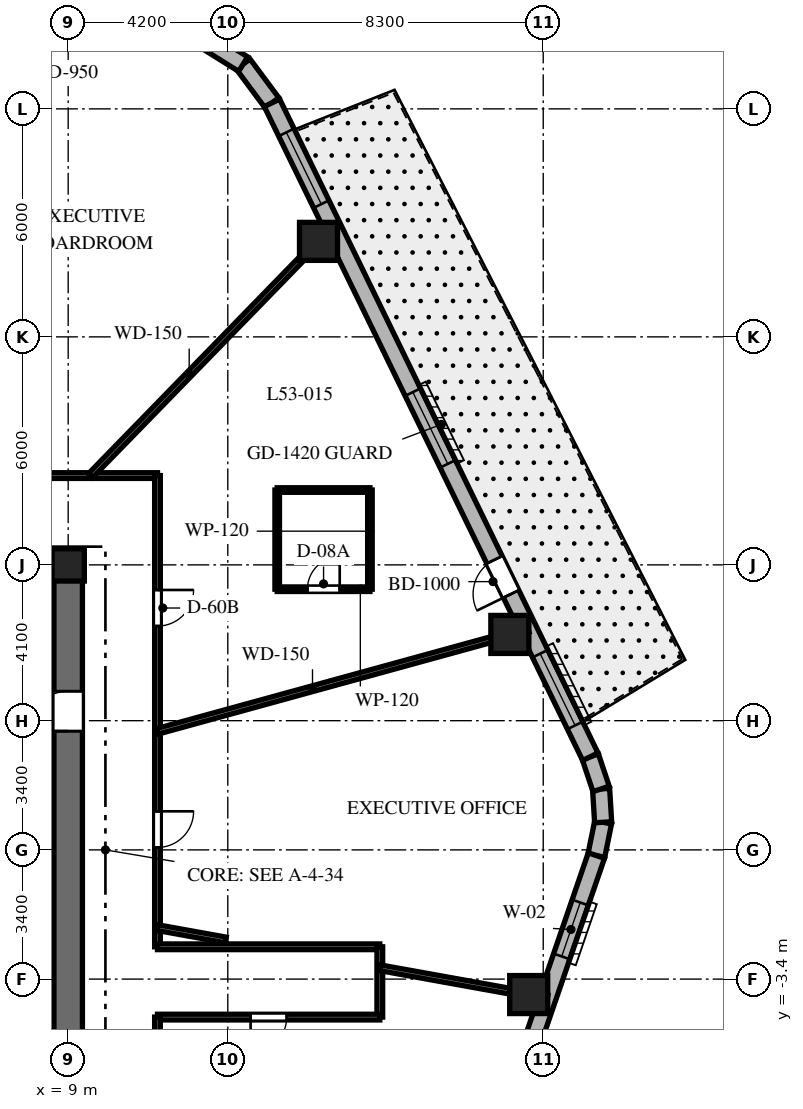
"""IFC4 building model, lengths in metres.
Left out: names, types, materials, properties, quantities, classifications, styles, units other than length and angle.
Written with IfcOpenShell. Run it as: python <this file> out.ifc"""

import sys

from ifc_helpers import new_model, si_unit, direction, frame, frame_2d, origin, origin_2d, place, context, subcontext, project, spatial, rectangle, extrude, element, fill, save


model = new_model("IFC4")
c1 = context("Model", 3, precision=1e-05, world=origin(), true_north=direction((0.0, 1.0)))
c2 = subcontext(c1, "Body", "Model", "MODEL_VIEW")
j1 = project(units=[si_unit("LENGTHUNIT", "METRE"), si_unit("PLANEANGLEUNIT", "RADIAN")], contexts=[c1])
p1 = place(None, origin())
s1 = spatial("IfcSite", under=j1, at=p1, CompositionType="ELEMENT")
p2 = place(p1, origin())
s2 = spatial("IfcBuilding", under=s1, at=p2, CompositionType="ELEMENT")
p3 = place(p2, frame((0.0, 0.0, 214.1)))
s3 = spatial("IfcBuildingStorey", under=s2, at=p3, CompositionType="ELEMENT", Elevation=214.1)
p4 = place(p3, frame((1.85, 7.5, 0.0), z_axis=(0.0, 0.0, 1.0), x_axis=(1.0, 0.0, 0.0)))
e1 = element("IfcWall", 1, at=p4, inside=s3, PredefinedType="SHEAR", context=c2, shape_type="SweptSolid", body=[
    extrude(rectangle(XDim=7.525, YDim=0.75, at=frame_2d((3.762, 0.0))), origin(), (0.0, 0.0, 1.0), 3.8),
])
p5 = place(p3, frame((9.0, -7.125, 0.0), z_axis=(0.0, 0.0, 1.0), x_axis=(0.0, 1.0, 0.0)))
e2 = element("IfcWall", 2, at=p5, inside=s3, PredefinedType="SHEAR", context=c2, shape_type="SweptSolid", body=[
    extrude(rectangle(XDim=14.25, YDim=0.75, at=frame_2d((7.125, 0.0))), origin(), (0.0, 0.0, 1.0), 3.8),
])
p6 = place(p5, frame((10.25, 0.0, 0.0)))
e3 = element("IfcOpeningElement", 3, at=p6, cuts=e2, PredefinedType="OPENING", context=c2, shape_type="SweptSolid", body=[
    extrude(rectangle(XDim=1.05, YDim=2.15, at=frame_2d((0.525, 1.075))), frame((0.0, 0.385, 0.0), z_axis=(0.0, -1.0, 0.0), x_axis=(1.0, 0.0, 0.0)), (0.0, 0.0, 1.0), 0.77),
])
p7 = place(p3, frame((9.0, 7.5, 0.0), z_axis=(0.0, 0.0, 1.0), x_axis=(1.0, 0.0, 0.0)))
e4 = element("IfcColumn", 4, at=p7, inside=s3, PredefinedType="COLUMN", context=c2, shape_type="SweptSolid", body=[
    extrude(rectangle(XDim=0.85, YDim=0.85, at=origin_2d()), origin(), (0.0, 0.0, 1.0), 3.8),
])
for number, where, z_axis, x_axis in (
    (5, (21.118, -3.807, 0.0), (0.0, 0.0, 1.0), (1.0, 0.0, 0.0)),
    (6, (20.622, 5.67, 0.0), (0.0, 0.0, 1.0), (1.0, 0.0, 0.0)),
    (7, (15.587, 16.013, 0.0), (0.0, 0.0, 1.0), (1.0, 0.0, 0.0)),
):
    element("IfcColumn", number, at=place(p3, frame(where, z_axis=z_axis, x_axis=x_axis)), inside=s3, PredefinedType="COLUMN", context=c2, shape_type="SweptSolid", body=[
        extrude(rectangle(XDim=1.0, YDim=1.0, at=origin_2d()), origin(), (0.0, 0.0, 1.0), 3.8),
    ])
p8 = place(p3, frame((22.898, -0.15, 0.0), z_axis=(0.0, 0.0, 1.0), x_axis=(0.199055826889, 0.979988151858, 0.0)))
e8 = element("IfcWall", 8, at=p8, inside=s3, PredefinedType="SOLIDWALL", context=c2, shape_type="SweptSolid", body=[
    extrude(rectangle(XDim=0.894, YDim=0.45, at=frame_2d((0.447, 0.0))), origin(), (0.0, 0.0, 1.0), 3.5),
])
p9 = place(p3, frame((23.076, 0.727, 0.0), z_axis=(0.0, 0.0, 1.0), x_axis=(-0.060805222108, 0.998149650586, 0.0)))
e9 = element("IfcWall", 9, at=p9, inside=s3, PredefinedType="SOLIDWALL", context=c2, shape_type="SweptSolid", body=[
    extrude(rectangle(XDim=0.879, YDim=0.45, at=frame_2d((0.44, 0.0))), origin(), (0.0, 0.0, 1.0), 3.5),
])
p10 = place(p3, frame((23.023, 1.604, 0.0), z_axis=(0.0, 0.0, 1.0), x_axis=(-0.316801227695, 0.948491951537, 0.0)))
e10 = element("IfcWall", 10, at=p10, inside=s3, PredefinedType="SOLIDWALL", context=c2, shape_type="SweptSolid", body=[
    extrude(rectangle(XDim=0.894, YDim=0.45, at=frame_2d((0.447, 0.0))), origin(), (0.0, 0.0, 1.0), 3.5),
])
p11 = place(p3, frame((14.362, 19.658, 0.0), z_axis=(0.0, 0.0, 1.0), x_axis=(-0.596642462792, 0.80250717853, 0.0)))
e11 = element("IfcWall", 11, at=p11, inside=s3, PredefinedType="SOLIDWALL", context=c2, shape_type="SweptSolid", body=[
    extrude(rectangle(XDim=1.27, YDim=0.45, at=frame_2d((0.635, 0.0))), origin(), (0.0, 0.0, 1.0), 3.5),
])
p12 = place(p3, frame((13.604, 20.678, 0.0), z_axis=(0.0, 0.0, 1.0), x_axis=(-0.847910404124, 0.53013955387, 0.0)))
e12 = element("IfcWall", 12, at=p12, inside=s3, PredefinedType="SOLIDWALL", context=c2, shape_type="SweptSolid", body=[
    extrude(rectangle(XDim=1.249, YDim=0.45, at=frame_2d((0.624, 0.0))), origin(), (0.0, 0.0, 1.0), 3.5),
])
p13 = place(p3, frame((16.324, -19.275, 0.0), z_axis=(0.0, 0.0, 1.0), x_axis=(0.325083142304, 0.945685439557, 0.0)))
e13 = element("IfcWall", 13, at=p13, inside=s3, PredefinedType="SOLIDWALL", context=c2, shape_type="SweptSolid", body=[
    extrude(rectangle(XDim=20.224, YDim=0.45, at=frame_2d((10.112, 0.0))), origin(), (0.0, 0.0, 1.0), 3.5),
])
p14 = place(p13, frame((1.253, 0.0, 0.8)))
e14 = element("IfcOpeningElement", 14, at=p14, cuts=e13, PredefinedType="OPENING", context=c2, shape_type="SweptSolid", body=[
    extrude(rectangle(XDim=1.5, YDim=1.8, at=frame_2d((0.75, 0.9))), frame((0.0, 0.235, 0.0), z_axis=(0.0, -1.0, 0.0), x_axis=(1.0, 0.0, 0.0)), (0.0, 0.0, 1.0), 0.47),
])
p15 = place(p13, frame((9.309, 0.0, 0.8)))
e15 = element("IfcOpeningElement", 15, at=p15, cuts=e13, PredefinedType="OPENING", context=c2, shape_type="SweptSolid", body=[
    extrude(rectangle(XDim=1.5, YDim=1.8, at=frame_2d((0.75, 0.9))), frame((0.0, 0.235, 0.0), z_axis=(0.0, -1.0, 0.0), x_axis=(1.0, 0.0, 0.0)), (0.0, 0.0, 1.0), 0.47),
])
p16 = place(p13, frame((17.418, 0.0, 0.8)))
e16 = element("IfcOpeningElement", 16, at=p16, cuts=e13, PredefinedType="OPENING", context=c2, shape_type="SweptSolid", body=[
    extrude(rectangle(XDim=1.5, YDim=1.8, at=frame_2d((0.75, 0.9))), frame((0.0, 0.235, 0.0), z_axis=(0.0, -1.0, 0.0), x_axis=(1.0, 0.0, 0.0)), (0.0, 0.0, 1.0), 0.47),
])
p17 = place(p3, frame((22.74, 2.452, 0.0), z_axis=(0.0, 0.0, 1.0), x_axis=(-0.437753424814, 0.899095066755, 0.0)))
e17 = element("IfcWall", 17, at=p17, inside=s3, PredefinedType="SOLIDWALL", context=c2, shape_type="SweptSolid", body=[
    extrude(rectangle(XDim=19.137, YDim=0.45, at=frame_2d((9.569, 0.0))), origin(), (0.0, 0.0, 1.0), 3.5),
])
p18 = place(p17, frame((4.763, 0.0, 0.0)))
e18 = element("IfcOpeningElement", 18, at=p18, cuts=e17, PredefinedType="OPENING", context=c2, shape_type="SweptSolid", body=[
    extrude(rectangle(XDim=1.0, YDim=2.15, at=frame_2d((0.5, 1.075))), frame((0.0, 0.235, 0.0), z_axis=(0.0, -1.0, 0.0), x_axis=(1.0, 0.0, 0.0)), (0.0, 0.0, 1.0), 0.47),
])
p19 = place(p17, frame((8.57, 0.0, 0.8)))
e19 = element("IfcOpeningElement", 19, at=p19, cuts=e17, PredefinedType="OPENING", context=c2, shape_type="SweptSolid", body=[
    extrude(rectangle(XDim=2.1, YDim=1.85, at=frame_2d((1.05, 0.925))), frame((0.0, 0.235, 0.0), z_axis=(0.0, -1.0, 0.0), x_axis=(1.0, 0.0, 0.0)), (0.0, 0.0, 1.0), 0.47),
])
p20 = place(p17, frame((16.173, 0.0, 0.8)))
e20 = element("IfcOpeningElement", 20, at=p20, cuts=e17, PredefinedType="OPENING", context=c2, shape_type="SweptSolid", body=[
    extrude(rectangle(XDim=2.1, YDim=1.85, at=frame_2d((1.05, 0.925))), frame((0.0, 0.235, 0.0), z_axis=(0.0, -1.0, 0.0), x_axis=(1.0, 0.0, 0.0)), (0.0, 0.0, 1.0), 0.47),
])
p21 = place(p17, frame((0.916, 0.0, 0.8)))
e21 = element("IfcOpeningElement", 21, at=p21, cuts=e17, PredefinedType="OPENING", context=c2, shape_type="SweptSolid", body=[
    extrude(rectangle(XDim=2.1, YDim=1.85, at=frame_2d((1.05, 0.925))), frame((0.0, 0.235, 0.0), z_axis=(0.0, -1.0, 0.0), x_axis=(1.0, 0.0, 0.0)), (0.0, 0.0, 1.0), 0.47),
])
p22 = place(p3, frame((0.92, 9.85, 0.0), z_axis=(0.0, 0.0, 1.0), x_axis=(1.0, 0.0, 0.0)))
e22 = element("IfcWall", 22, at=p22, inside=s3, PredefinedType="PARTITIONING", context=c2, shape_type="SweptSolid", body=[
    extrude(rectangle(XDim=10.43, YDim=0.15, at=frame_2d((5.215, 0.0))), origin(), (0.0, 0.0, 1.0), 2.99),
])
p23 = place(p22, frame((4.949, 0.0, 0.0)))
e23 = element("IfcOpeningElement", 23, at=p23, cuts=e22, PredefinedType="OPENING", context=c2, shape_type="SweptSolid", body=[
    extrude(rectangle(XDim=0.95, YDim=2.03, at=frame_2d((0.475, 1.015))), frame((0.0, 0.085, 0.0), z_axis=(0.0, -1.0, 0.0), x_axis=(1.0, 0.0, 0.0)), (0.0, 0.0, 1.0), 0.17),
])
p24 = place(p3, frame((11.35, 9.85, 0.0), z_axis=(0.0, 0.0, 1.0), x_axis=(0.0, -1.0, 0.0)))
e24 = element("IfcWall", 24, at=p24, inside=s3, PredefinedType="PARTITIONING", context=c2, shape_type="SweptSolid", body=[
    extrude(rectangle(XDim=12.4, YDim=0.15, at=frame_2d((6.2, 0.0))), origin(), (0.0, 0.0, 1.0), 2.99),
])
p25 = place(p24, frame((3.01, 0.0, 0.0)))
e25 = element("IfcOpeningElement", 25, at=p25, cuts=e24, PredefinedType="OPENING", context=c2, shape_type="SweptSolid", body=[
    extrude(rectangle(XDim=0.95, YDim=2.03, at=frame_2d((0.475, 1.015))), frame((0.0, 0.085, 0.0), z_axis=(0.0, -1.0, 0.0), x_axis=(1.0, 0.0, 0.0)), (0.0, 0.0, 1.0), 0.17),
])
p26 = place(p24, frame((8.835, 0.0, 0.0)))
e26 = element("IfcOpeningElement", 26, at=p26, cuts=e24, PredefinedType="OPENING", context=c2, shape_type="SweptSolid", body=[
    extrude(rectangle(XDim=0.95, YDim=2.03, at=frame_2d((0.475, 1.015))), frame((0.0, 0.085, 0.0), z_axis=(0.0, -1.0, 0.0), x_axis=(1.0, 0.0, 0.0)), (0.0, 0.0, 1.0), 0.17),
])
p27 = place(p3, frame((11.35, -2.55, 0.0), z_axis=(0.0, 0.0, 1.0), x_axis=(1.0, 0.0, 0.0)))
e27 = element("IfcWall", 27, at=p27, inside=s3, PredefinedType="PARTITIONING", context=c2, shape_type="SweptSolid", body=[
    extrude(rectangle(XDim=5.85, YDim=0.15, at=frame_2d((2.925, 0.0))), origin(), (0.0, 0.0, 1.0), 2.94),
])
p28 = place(p3, frame((17.2, -2.55, 0.0), z_axis=(0.0, 0.0, 1.0), x_axis=(0.0, -1.0, 0.0)))
e28 = element("IfcWall", 28, at=p28, inside=s3, PredefinedType="PARTITIONING", context=c2, shape_type="SweptSolid", body=[
    extrude(rectangle(XDim=1.85, YDim=0.15, at=frame_2d((0.925, 0.0))), origin(), (0.0, 0.0, 1.0), 2.94),
])
p29 = place(p3, frame((17.2, -4.4, 0.0), z_axis=(0.0, 0.0, 1.0), x_axis=(-1.0, 0.0, 0.0)))
e29 = element("IfcWall", 29, at=p29, inside=s3, PredefinedType="PARTITIONING", context=c2, shape_type="SweptSolid", body=[
    extrude(rectangle(XDim=5.85, YDim=0.15, at=frame_2d((2.925, 0.0))), origin(), (0.0, 0.0, 1.0), 2.94),
])
p30 = place(p29, frame((2.45, 0.0, 0.0)))
e30 = element("IfcOpeningElement", 30, at=p30, cuts=e29, PredefinedType="OPENING", context=c2, shape_type="SweptSolid", body=[
    extrude(rectangle(XDim=0.95, YDim=2.03, at=frame_2d((0.475, 1.015))), frame((0.0, 0.085, 0.0), z_axis=(0.0, -1.0, 0.0), x_axis=(1.0, 0.0, 0.0)), (0.0, 0.0, 1.0), 0.17),
])
p31 = place(p3, frame((11.35, -4.4, 0.0), z_axis=(0.0, 0.0, 1.0), x_axis=(0.0, -1.0, 0.0)))
e31 = element("IfcWall", 31, at=p31, inside=s3, PredefinedType="PARTITIONING", context=c2, shape_type="SweptSolid", body=[
    extrude(rectangle(XDim=5.45, YDim=0.15, at=frame_2d((2.725, 0.0))), origin(), (0.0, 0.0, 1.0), 2.99),
])
p32 = place(p3, frame((11.35, 3.121, 0.0), z_axis=(0.0, 0.0, 1.0), x_axis=(0.964212793822, 0.265129568758, 0.0)))
e32 = element("IfcWall", 32, at=p32, inside=s3, PredefinedType="PARTITIONING", context=c2, shape_type="SweptSolid", body=[
    extrude(rectangle(XDim=10.12, YDim=0.15, at=frame_2d((5.06, 0.0))), origin(), (0.0, 0.0, 1.0), 2.74),
])
p33 = place(p3, frame((9.588, 9.85, 0.0), z_axis=(0.0, 0.0, 1.0), x_axis=(0.697519469595, 0.716565830567, 0.0)))
e33 = element("IfcWall", 33, at=p33, inside=s3, PredefinedType="PARTITIONING", context=c2, shape_type="SweptSolid", body=[
    extrude(rectangle(XDim=9.126, YDim=0.15, at=frame_2d((4.563, 0.0))), origin(), (0.0, 0.0, 1.0), 2.74),
])
p34 = place(p3, frame((11.35, -2.046, 0.0), z_axis=(0.0, 0.0, 1.0), x_axis=(0.984127783205, -0.177461281195, 0.0)))
e34 = element("IfcWall", 34, at=p34, inside=s3, PredefinedType="PARTITIONING", context=c2, shape_type="SweptSolid", body=[
    extrude(rectangle(XDim=1.826, YDim=0.15, at=frame_2d((0.913, 0.0))), origin(), (0.0, 0.0, 1.0), 3.5),
])
p35 = place(p3, frame((17.2, -3.101, 0.0), z_axis=(0.0, 0.0, 1.0), x_axis=(0.98413465883, -0.177423147559, 0.0)))
e35 = element("IfcWall", 35, at=p35, inside=s3, PredefinedType="PARTITIONING", context=c2, shape_type="SweptSolid", body=[
    extrude(rectangle(XDim=4.482, YDim=0.15, at=frame_2d((2.241, 0.0))), origin(), (0.0, 0.0, 1.0), 2.74),
])
p36 = place(p3, frame((14.5, 6.86, 0.0), z_axis=(0.0, 0.0, 1.0), x_axis=(1.0, 0.0, 0.0)))
e36 = element("IfcWall", 36, at=p36, inside=s3, PredefinedType="PARTITIONING", context=c2, shape_type="SweptSolid", body=[
    extrude(rectangle(XDim=2.44, YDim=0.12, at=frame_2d((1.22, 0.0))), origin(), (0.0, 0.0, 1.0), 3.026),
])
p37 = place(p36, frame((0.795, 0.0, 0.0)))
e37 = element("IfcOpeningElement", 37, at=p37, cuts=e36, PredefinedType="OPENING", context=c2, shape_type="SweptSolid", body=[
    extrude(rectangle(XDim=0.85, YDim=2.03, at=frame_2d((0.425, 1.015))), frame((0.0, 0.07, 0.0), z_axis=(0.0, -1.0, 0.0), x_axis=(1.0, 0.0, 0.0)), (0.0, 0.0, 1.0), 0.14),
])
p38 = place(p3, frame((16.94, 6.86, 0.0), z_axis=(0.0, 0.0, 1.0), x_axis=(0.0, 1.0, 0.0)))
e38 = element("IfcWall", 38, at=p38, inside=s3, PredefinedType="PARTITIONING", context=c2, shape_type="SweptSolid", body=[
    extrude(rectangle(XDim=2.61, YDim=0.12, at=frame_2d((1.305, 0.0))), origin(), (0.0, 0.0, 1.0), 3.5),
])
p39 = place(p3, frame((16.94, 9.47, 0.0), z_axis=(0.0, 0.0, 1.0), x_axis=(-1.0, 0.0, 0.0)))
e39 = element("IfcWall", 39, at=p39, inside=s3, PredefinedType="PARTITIONING", context=c2, shape_type="SweptSolid", body=[
    extrude(rectangle(XDim=2.44, YDim=0.12, at=frame_2d((1.22, 0.0))), origin(), (0.0, 0.0, 1.0), 3.026),
])
p40 = place(p3, frame((14.5, 9.47, 0.0), z_axis=(0.0, 0.0, 1.0), x_axis=(0.0, -1.0, 0.0)))
e40 = element("IfcWall", 40, at=p40, inside=s3, PredefinedType="PARTITIONING", context=c2, shape_type="SweptSolid", body=[
    extrude(rectangle(XDim=2.61, YDim=0.12, at=frame_2d((1.305, 0.0))), origin(), (0.0, 0.0, 1.0), 3.5),
])
p41 = place(p16, origin())
e41 = element("IfcWindow", 41, at=p41, inside=s3, PartitioningType="SINGLE_PANEL", PredefinedType="WINDOW", context=c2, shape_type="SweptSolid", body=[
    extrude(rectangle(XDim=1.5, YDim=1.8, at=frame_2d((0.75, 0.9))), frame((0.0, 0.03, 0.0), z_axis=(0.0, -1.0, 0.0), x_axis=(1.0, 0.0, 0.0)), (0.0, 0.0, 1.0), 0.06),
])
fill(e16, e41)
p42 = place(p18, origin())
e42 = element("IfcDoor", 42, at=p42, inside=s3, OperationType="SINGLE_SWING_LEFT", PredefinedType="DOOR", context=c2, shape_type="SweptSolid", body=[
    extrude(rectangle(XDim=1.0, YDim=2.15, at=frame_2d((0.5, 1.075))), frame((0.0, 0.025, 0.0), z_axis=(0.0, -1.0, 0.0), x_axis=(1.0, 0.0, 0.0)), (0.0, 0.0, 1.0), 0.05),
])
fill(e18, e42)
p43 = place(p19, origin())
e43 = element("IfcWindow", 43, at=p43, inside=s3, PartitioningType="SINGLE_PANEL", PredefinedType="WINDOW", context=c2, shape_type="SweptSolid", body=[
    extrude(rectangle(XDim=2.1, YDim=1.85, at=frame_2d((1.05, 0.925))), frame((0.0, 0.03, 0.0), z_axis=(0.0, -1.0, 0.0), x_axis=(1.0, 0.0, 0.0)), (0.0, 0.0, 1.0), 0.06),
])
fill(e19, e43)
p44 = place(p20, origin())
e44 = element("IfcWindow", 44, at=p44, inside=s3, PartitioningType="SINGLE_PANEL", PredefinedType="WINDOW", context=c2, shape_type="SweptSolid", body=[
    extrude(rectangle(XDim=2.1, YDim=1.85, at=frame_2d((1.05, 0.925))), frame((0.0, 0.03, 0.0), z_axis=(0.0, -1.0, 0.0), x_axis=(1.0, 0.0, 0.0)), (0.0, 0.0, 1.0), 0.06),
])
fill(e20, e44)
p45 = place(p21, origin())
e45 = element("IfcWindow", 45, at=p45, inside=s3, PartitioningType="SINGLE_PANEL", PredefinedType="WINDOW", context=c2, shape_type="SweptSolid", body=[
    extrude(rectangle(XDim=2.1, YDim=1.85, at=frame_2d((1.05, 0.925))), frame((0.0, 0.03, 0.0), z_axis=(0.0, -1.0, 0.0), x_axis=(1.0, 0.0, 0.0)), (0.0, 0.0, 1.0), 0.06),
])
fill(e21, e45)
p46 = place(p6, origin())
e46 = element("IfcDoor", 46, at=p46, inside=s3, OperationType="SINGLE_SWING_LEFT", PredefinedType="DOOR", context=c2, shape_type="SweptSolid", body=[
    extrude(rectangle(XDim=1.05, YDim=2.15, at=frame_2d((0.525, 1.075))), frame((0.0, 0.025, 0.0), z_axis=(0.0, -1.0, 0.0), x_axis=(1.0, 0.0, 0.0)), (0.0, 0.0, 1.0), 0.05),
])
fill(e3, e46)
p47 = place(p25, origin())
e47 = element("IfcDoor", 47, at=p47, inside=s3, OperationType="SINGLE_SWING_LEFT", PredefinedType="DOOR", context=c2, shape_type="SweptSolid", body=[
    extrude(rectangle(XDim=0.95, YDim=2.03, at=frame_2d((0.475, 1.015))), frame((0.0, 0.025, 0.0), z_axis=(0.0, -1.0, 0.0), x_axis=(1.0, 0.0, 0.0)), (0.0, 0.0, 1.0), 0.05),
])
fill(e25, e47)
p48 = place(p37, origin())
e48 = element("IfcDoor", 48, at=p48, inside=s3, OperationType="SINGLE_SWING_RIGHT", PredefinedType="DOOR", context=c2, shape_type="SweptSolid", body=[
    extrude(rectangle(XDim=0.85, YDim=2.03, at=frame_2d((0.425, 1.015))), frame((0.0, 0.025, 0.0), z_axis=(0.0, -1.0, 0.0), x_axis=(1.0, 0.0, 0.0)), (0.0, 0.0, 1.0), 0.05),
])
fill(e37, e48)
p49 = place(p30, origin())
e49 = element("IfcDoor", 49, at=p49, inside=s3, OperationType="SINGLE_SWING_RIGHT", PredefinedType="DOOR", context=c2, shape_type="SweptSolid", body=[
    extrude(rectangle(XDim=0.95, YDim=2.03, at=frame_2d((0.475, 1.015))), frame((0.0, 0.025, 0.0), z_axis=(0.0, -1.0, 0.0), x_axis=(1.0, 0.0, 0.0)), (0.0, 0.0, 1.0), 0.05),
])
fill(e30, e49)
p50 = place(p26, origin())
e50 = element("IfcDoor", 50, at=p50, inside=s3, OperationType="SINGLE_SWING_LEFT", PredefinedType="DOOR", context=c2, shape_type="SweptSolid", body=[
    extrude(rectangle(XDim=0.95, YDim=2.03, at=frame_2d((0.475, 1.015))), frame((0.0, 0.025, 0.0), z_axis=(0.0, -1.0, 0.0), x_axis=(1.0, 0.0, 0.0)), (0.0, 0.0, 1.0), 0.05),
])
fill(e26, e50)
save(model, sys.argv[1])
